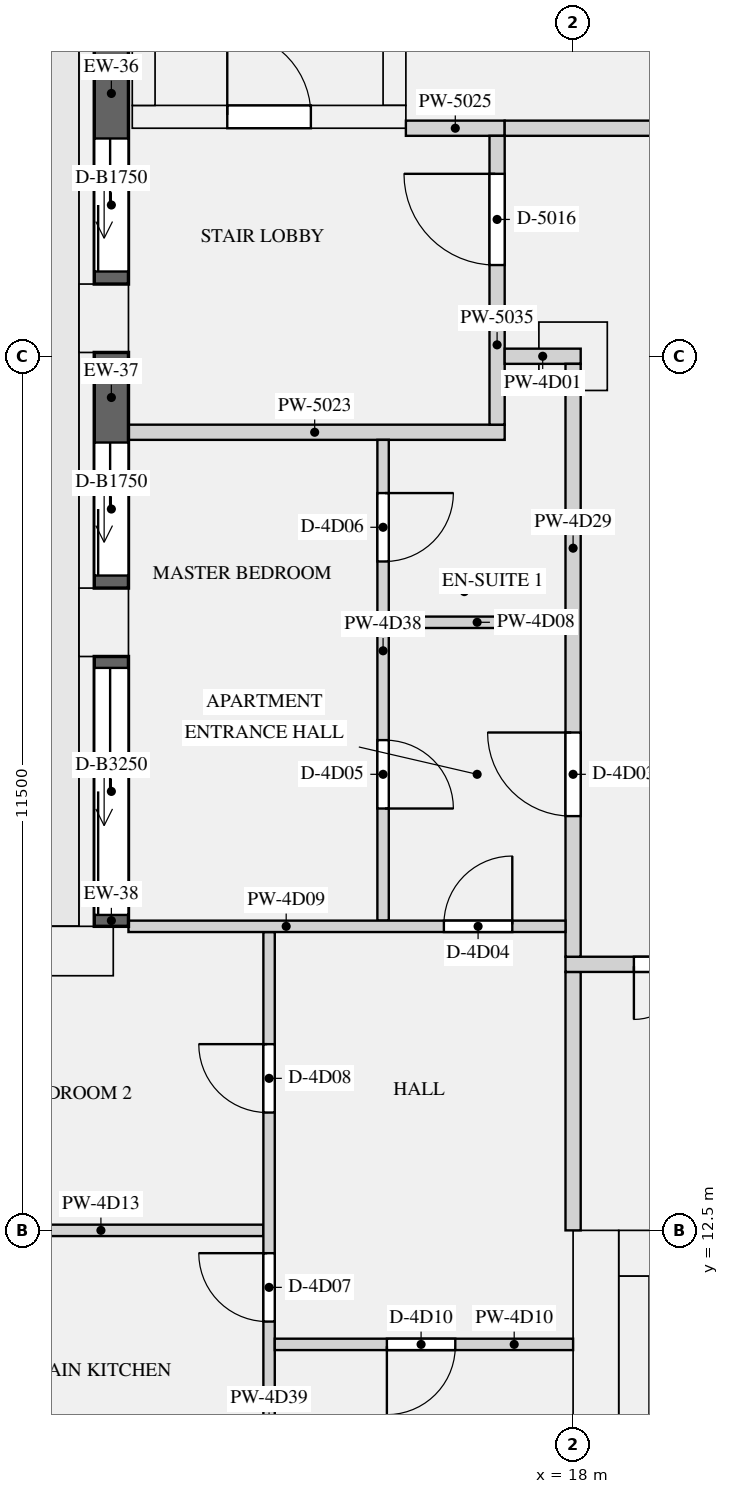
"""IFC4 building model, lengths in metres.
Left out: names, types, materials, properties, quantities, classifications, styles, units other than length and angle.
Written with IfcOpenShell. Run it as: python <this file> out.ifc"""

import sys

from ifc_helpers import new_model, si_unit, direction, frame, frame_2d, origin, origin_2d, place, context, subcontext, project, spatial, rectangle, extrude, element, fill, save


model = new_model("IFC4")
c1 = context("Model", 3, precision=1e-05, world=origin(), true_north=direction((0.0, 1.0)))
c2 = subcontext(c1, "Body", "Model", "MODEL_VIEW")
j1 = project(units=[si_unit("LENGTHUNIT", "METRE"), si_unit("PLANEANGLEUNIT", "RADIAN")], contexts=[c1])
p1 = place(None, origin())
s1 = spatial("IfcSite", under=j1, at=p1, CompositionType="ELEMENT")
p2 = place(p1, origin())
s2 = spatial("IfcBuilding", under=s1, at=p2, CompositionType="ELEMENT")
p3 = place(p2, frame((0.0, 0.0, 223.2)))
s3 = spatial("IfcBuildingStorey", under=s2, at=p3, CompositionType="ELEMENT", Elevation=223.2)
for number, where, z_axis, x_axis in (
    (1, (11.825, 24.5, 0.0), (0.0, 0.0, 1.0), (0.0, -1.0, 0.0)),
    (2, (11.825, 20.5, 0.0), (0.0, 0.0, 1.0), (0.0, -1.0, 0.0)),
    (3, (11.5, 16.175, 0.0), (0.0, 0.0, 1.0), (-1.0, 0.0, 0.0)),
):
    element("IfcColumn", number, at=place(p3, frame(where, z_axis=z_axis, x_axis=x_axis)), inside=s3, PredefinedType="USERDEFINED", context=c2, shape_type="SweptSolid", body=[
        extrude(rectangle(XDim=0.9, YDim=0.65, at=origin_2d()), origin(), (0.0, 0.0, 1.0), 3.15),
    ])
p4 = place(p3, frame((18.0, 24.0, 0.0), z_axis=(0.0, 0.0, 1.0), x_axis=(1.0, 0.0, 0.0)))
e4 = element("IfcColumn", 4, at=p4, inside=s3, PredefinedType="COLUMN", context=c2, shape_type="SweptSolid", body=[
    extrude(rectangle(XDim=0.9, YDim=0.9, at=origin_2d()), origin(), (0.0, 0.0, 1.0), 3.15),
])
p5 = place(p3, frame((18.3, 0.0, 0.0), z_axis=(0.0, 0.0, 1.0), x_axis=(0.0, 1.0, 0.0)))
e5 = element("IfcWall", 5, at=p5, inside=s3, PredefinedType="SHEAR", context=c2, shape_type="SweptSolid", body=[
    extrude(rectangle(XDim=12.5, YDim=0.6, at=frame_2d((6.25, 0.0))), origin(), (0.0, 0.0, 1.0), 3.15),
])
p6 = place(p3, frame((18.6, 12.2, 0.0), z_axis=(0.0, 0.0, 1.0), x_axis=(1.0, 0.0, 0.0)))
e6 = element("IfcWall", 6, at=p6, inside=s3, PredefinedType="SHEAR", context=c2, shape_type="SweptSolid", body=[
    extrude(rectangle(XDim=34.8, YDim=0.6, at=frame_2d((17.4, 0.0))), origin(), (0.0, 0.0, 1.0), 3.15),
])
p7 = place(p6, frame((24.575, 0.0, 0.0)))
e7 = element("IfcOpeningElement", 7, at=p7, cuts=e6, PredefinedType="OPENING", context=c2, shape_type="SweptSolid", body=[
    extrude(rectangle(XDim=1.1, YDim=2.1, at=frame_2d((0.55, 1.05))), frame((0.0, 0.31, 0.0), z_axis=(0.0, -1.0, 0.0), x_axis=(1.0, 0.0, 0.0)), (0.0, 0.0, 1.0), 0.62),
])
p8 = place(p6, frame((26.825, 0.0, 0.0)))
e8 = element("IfcOpeningElement", 8, at=p8, cuts=e6, PredefinedType="OPENING", context=c2, shape_type="SweptSolid", body=[
    extrude(rectangle(XDim=1.1, YDim=2.1, at=frame_2d((0.55, 1.05))), frame((0.0, 0.31, 0.0), z_axis=(0.0, -1.0, 0.0), x_axis=(1.0, 0.0, 0.0)), (0.0, 0.0, 1.0), 0.62),
])
p9 = place(p6, frame((29.075, 0.0, 0.0)))
e9 = element("IfcOpeningElement", 9, at=p9, cuts=e6, PredefinedType="OPENING", context=c2, shape_type="SweptSolid", body=[
    extrude(rectangle(XDim=1.1, YDim=2.1, at=frame_2d((0.55, 1.05))), frame((0.0, 0.31, 0.0), z_axis=(0.0, -1.0, 0.0), x_axis=(1.0, 0.0, 0.0)), (0.0, 0.0, 1.0), 0.62),
])
p10 = place(p6, frame((11.95, 0.0, 0.0)))
e10 = element("IfcOpeningElement", 10, at=p10, cuts=e6, PredefinedType="OPENING", context=c2, shape_type="SweptSolid", body=[
    extrude(rectangle(XDim=0.9, YDim=2.1, at=frame_2d((0.45, 1.05))), frame((0.0, 0.31, 0.0), z_axis=(0.0, -1.0, 0.0), x_axis=(1.0, 0.0, 0.0)), (0.0, 0.0, 1.0), 0.62),
])
p11 = place(p6, frame((18.45, 0.0, 0.0)))
e11 = element("IfcOpeningElement", 11, at=p11, cuts=e6, PredefinedType="OPENING", context=c2, shape_type="SweptSolid", body=[
    extrude(rectangle(XDim=0.9, YDim=2.1, at=frame_2d((0.45, 1.05))), frame((0.0, 0.31, 0.0), z_axis=(0.0, -1.0, 0.0), x_axis=(1.0, 0.0, 0.0)), (0.0, 0.0, 1.0), 0.62),
])
p12 = place(p6, frame((1.55, 0.0, 0.0)))
e12 = element("IfcOpeningElement", 12, at=p12, cuts=e6, PredefinedType="OPENING", context=c2, shape_type="SweptSolid", body=[
    extrude(rectangle(XDim=1.2, YDim=2.1, at=frame_2d((0.6, 1.05))), frame((0.0, 0.31, 0.0), z_axis=(0.0, -1.0, 0.0), x_axis=(1.0, 0.0, 0.0)), (0.0, 0.0, 1.0), 0.62),
])
p13 = place(p6, frame((32.05, 0.0, 0.0)))
e13 = element("IfcOpeningElement", 13, at=p13, cuts=e6, PredefinedType="OPENING", context=c2, shape_type="SweptSolid", body=[
    extrude(rectangle(XDim=1.2, YDim=2.1, at=frame_2d((0.6, 1.05))), frame((0.0, 0.31, 0.0), z_axis=(0.0, -1.0, 0.0), x_axis=(1.0, 0.0, 0.0)), (0.0, 0.0, 1.0), 0.62),
])
p14 = place(p3, frame((18.8, 1.0, 0.0), z_axis=(0.0, 0.0, 1.0), x_axis=(0.0, 1.0, 0.0)))
e14 = element("IfcWall", 14, at=p14, inside=s3, PredefinedType="SHEAR", context=c2, shape_type="SweptSolid", body=[
    extrude(rectangle(XDim=10.9, YDim=0.4, at=frame_2d((5.45, 0.0))), origin(), (0.0, 0.0, 1.0), 3.15),
])
p15 = place(p3, frame((12.2, 27.15, 0.0), z_axis=(0.0, 0.0, 1.0), x_axis=(1.0, 0.0, 0.0)))
e15 = element("IfcWall", 15, at=p15, inside=s3, PredefinedType="SHEAR", context=c2, shape_type="SweptSolid", body=[
    extrude(rectangle(XDim=3.6, YDim=0.3, at=frame_2d((1.8, 0.0))), origin(), (0.0, 0.0, 1.0), 3.15),
])
p16 = place(p15, frame((1.25, 0.0, 0.0)))
e16 = element("IfcOpeningElement", 16, at=p16, cuts=e15, PredefinedType="OPENING", context=c2, shape_type="SweptSolid", body=[
    extrude(rectangle(XDim=1.1, YDim=2.1, at=frame_2d((0.55, 1.05))), frame((0.0, 0.16, 0.0), z_axis=(0.0, -1.0, 0.0), x_axis=(1.0, 0.0, 0.0)), (0.0, 0.0, 1.0), 0.32),
])
for number, where, z_axis, x_axis in (
    (17, (12.35, 27.3, 0.0), (0.0, 0.0, 1.0), (0.0, 1.0, 0.0)),
    (18, (15.65, 27.3, 0.0), (0.0, 0.0, 1.0), (0.0, 1.0, 0.0)),
):
    element("IfcWall", number, at=place(p3, frame(where, z_axis=z_axis, x_axis=x_axis)), inside=s3, PredefinedType="SHEAR", context=c2, shape_type="SweptSolid", body=[
        extrude(rectangle(XDim=7.8, YDim=0.3, at=frame_2d((3.9, 0.0))), origin(), (0.0, 0.0, 1.0), 3.15),
    ])
p17 = place(p3, frame((11.925, 28.05, 0.0), z_axis=(0.0, 0.0, 1.0), x_axis=(0.0, -1.0, 0.0)))
e19 = element("IfcWall", 19, at=p17, inside=s3, PredefinedType="SOLIDWALL", context=c2, shape_type="SweptSolid", body=[
    extrude(rectangle(XDim=3.1, YDim=0.45, at=frame_2d((1.55, 0.0))), origin(), (0.0, 0.0, 1.0), 2.83),
])
p18 = place(p17, frame((1.185, 0.0, 0.0)))
e20 = element("IfcOpeningElement", 20, at=p18, cuts=e19, PredefinedType="OPENING", context=c2, shape_type="SweptSolid", body=[
    extrude(rectangle(XDim=1.75, YDim=2.3, at=frame_2d((0.875, 1.15))), frame((0.0, 0.235, 0.0), z_axis=(0.0, -1.0, 0.0), x_axis=(1.0, 0.0, 0.0)), (0.0, 0.0, 1.0), 0.47),
])
p19 = place(p3, frame((11.925, 24.05, 0.0), z_axis=(0.0, 0.0, 1.0), x_axis=(0.0, -1.0, 0.0)))
e21 = element("IfcWall", 21, at=p19, inside=s3, PredefinedType="SOLIDWALL", context=c2, shape_type="SweptSolid", body=[
    extrude(rectangle(XDim=3.1, YDim=0.45, at=frame_2d((1.55, 0.0))), origin(), (0.0, 0.0, 1.0), 2.83),
])
p20 = place(p19, frame((1.185, 0.0, 0.0)))
e22 = element("IfcOpeningElement", 22, at=p20, cuts=e21, PredefinedType="OPENING", context=c2, shape_type="SweptSolid", body=[
    extrude(rectangle(XDim=1.75, YDim=2.3, at=frame_2d((0.875, 1.15))), frame((0.0, 0.235, 0.0), z_axis=(0.0, -1.0, 0.0), x_axis=(1.0, 0.0, 0.0)), (0.0, 0.0, 1.0), 0.47),
])
p21 = place(p3, frame((11.925, 20.05, 0.0), z_axis=(0.0, 0.0, 1.0), x_axis=(0.0, -1.0, 0.0)))
e23 = element("IfcWall", 23, at=p21, inside=s3, PredefinedType="SOLIDWALL", context=c2, shape_type="SweptSolid", body=[
    extrude(rectangle(XDim=3.55, YDim=0.45, at=frame_2d((1.775, 0.0))), origin(), (0.0, 0.0, 1.0), 2.83),
])
p22 = place(p21, frame((0.15, 0.0, 0.0)))
e24 = element("IfcOpeningElement", 24, at=p22, cuts=e23, PredefinedType="OPENING", context=c2, shape_type="SweptSolid", body=[
    extrude(rectangle(XDim=3.25, YDim=2.3, at=frame_2d((1.625, 1.15))), frame((0.0, 0.235, 0.0), z_axis=(0.0, -1.0, 0.0), x_axis=(1.0, 0.0, 0.0)), (0.0, 0.0, 1.0), 0.47),
])
p23 = place(p3, frame((12.1, 23.0, 0.0), z_axis=(0.0, 0.0, 1.0), x_axis=(1.0, 0.0, 0.0)))
e25 = element("IfcWall", 25, at=p23, inside=s3, PredefinedType="PARTITIONING", context=c2, shape_type="SweptSolid", body=[
    extrude(rectangle(XDim=5.0, YDim=0.2, at=frame_2d((2.5, 0.0))), origin(), (0.0, 0.0, 1.0), 2.83),
])
p24 = place(p3, frame((15.8, 27.0, 0.0), z_axis=(0.0, 0.0, 1.0), x_axis=(1.0, 0.0, 0.0)))
e26 = element("IfcWall", 26, at=p24, inside=s3, PredefinedType="PARTITIONING", context=c2, shape_type="SweptSolid", body=[
    extrude(rectangle(XDim=1.3, YDim=0.2, at=frame_2d((0.65, 0.0))), origin(), (0.0, 0.0, 1.0), 2.83),
])
p25 = place(p3, frame((18.0, 12.5, 0.0), z_axis=(0.0, 0.0, 1.0), x_axis=(0.0, 1.0, 0.0)))
e27 = element("IfcWall", 27, at=p25, inside=s3, PredefinedType="PARTITIONING", context=c2, shape_type="SweptSolid", body=[
    extrude(rectangle(XDim=3.4, YDim=0.2, at=frame_2d((1.7, 0.0))), origin(), (0.0, 0.0, 1.0), 2.83),
])
p26 = place(p3, frame((17.0, 23.1, 0.0), z_axis=(0.0, 0.0, 1.0), x_axis=(0.0, 1.0, 0.0)))
e28 = element("IfcWall", 28, at=p26, inside=s3, PredefinedType="PARTITIONING", context=c2, shape_type="SweptSolid", body=[
    extrude(rectangle(XDim=3.8, YDim=0.2, at=frame_2d((1.9, 0.0))), origin(), (0.0, 0.0, 1.0), 2.83),
])
p27 = place(p26, frame((2.1, 0.0, 0.0)))
e29 = element("IfcOpeningElement", 29, at=p27, cuts=e28, PredefinedType="OPENING", context=c2, shape_type="SweptSolid", body=[
    extrude(rectangle(XDim=1.2, YDim=2.1, at=frame_2d((0.6, 1.05))), frame((0.0, 0.11, 0.0), z_axis=(0.0, -1.0, 0.0), x_axis=(1.0, 0.0, 0.0)), (0.0, 0.0, 1.0), 0.22),
])
p28 = place(p3, frame((17.1, 24.0, 0.0), z_axis=(0.0, 0.0, 1.0), x_axis=(1.0, 0.0, 0.0)))
e30 = element("IfcWall", 30, at=p28, inside=s3, PredefinedType="PARTITIONING", context=c2, shape_type="SweptSolid", body=[
    extrude(rectangle(XDim=1.0, YDim=0.2, at=frame_2d((0.5, 0.0))), origin(), (0.0, 0.0, 1.0), 2.83),
])
p29 = place(p3, frame((17.1, 27.0, 0.0), z_axis=(0.0, 0.0, 1.0), x_axis=(1.0, 0.0, 0.0)))
e31 = element("IfcWall", 31, at=p29, inside=s3, PredefinedType="PARTITIONING", context=c2, shape_type="SweptSolid", body=[
    extrude(rectangle(XDim=6.975, YDim=0.2, at=frame_2d((3.487, 0.0))), origin(), (0.0, 0.0, 1.0), 2.83),
])
p30 = place(p3, frame((15.575, 20.5, 0.0), z_axis=(0.0, 0.0, 1.0), x_axis=(1.0, 0.0, 0.0)))
e32 = element("IfcWall", 32, at=p30, inside=s3, PredefinedType="PARTITIONING", context=c2, shape_type="SweptSolid", body=[
    extrude(rectangle(XDim=2.325, YDim=0.15, at=frame_2d((1.163, 0.0))), origin(), (0.0, 0.0, 1.0), 2.83),
])
p31 = place(p3, frame((12.15, 16.5, 0.0), z_axis=(0.0, 0.0, 1.0), x_axis=(1.0, 0.0, 0.0)))
e33 = element("IfcWall", 33, at=p31, inside=s3, PredefinedType="PARTITIONING", context=c2, shape_type="SweptSolid", body=[
    extrude(rectangle(XDim=5.75, YDim=0.15, at=frame_2d((2.875, 0.0))), origin(), (0.0, 0.0, 1.0), 2.83),
])
p32 = place(p31, frame((4.15, 0.0, 0.0)))
e34 = element("IfcOpeningElement", 34, at=p32, cuts=e33, PredefinedType="OPENING", context=c2, shape_type="SweptSolid", body=[
    extrude(rectangle(XDim=0.9, YDim=2.1, at=frame_2d((0.45, 1.05))), frame((0.0, 0.085, 0.0), z_axis=(0.0, -1.0, 0.0), x_axis=(1.0, 0.0, 0.0)), (0.0, 0.0, 1.0), 0.17),
])
p33 = place(p3, frame((14.075, 11.0, 0.0), z_axis=(0.0, 0.0, 1.0), x_axis=(1.0, 0.0, 0.0)))
e35 = element("IfcWall", 35, at=p33, inside=s3, PredefinedType="PARTITIONING", context=c2, shape_type="SweptSolid", body=[
    extrude(rectangle(XDim=3.925, YDim=0.15, at=frame_2d((1.962, 0.0))), origin(), (0.0, 0.0, 1.0), 2.83),
])
p34 = place(p33, frame((1.475, 0.0, 0.0)))
e36 = element("IfcOpeningElement", 36, at=p34, cuts=e35, PredefinedType="OPENING", context=c2, shape_type="SweptSolid", body=[
    extrude(rectangle(XDim=0.9, YDim=2.1, at=frame_2d((0.45, 1.05))), frame((0.0, 0.085, 0.0), z_axis=(0.0, -1.0, 0.0), x_axis=(1.0, 0.0, 0.0)), (0.0, 0.0, 1.0), 0.17),
])
p35 = place(p3, frame((9.65, 12.5, 0.0), z_axis=(0.0, 0.0, 1.0), x_axis=(1.0, 0.0, 0.0)))
e37 = element("IfcWall", 37, at=p35, inside=s3, PredefinedType="PARTITIONING", context=c2, shape_type="SweptSolid", body=[
    extrude(rectangle(XDim=4.275, YDim=0.15, at=frame_2d((2.138, 0.0))), origin(), (0.0, 0.0, 1.0), 2.83),
])
p36 = place(p3, frame((17.9, 16.0, 0.0), z_axis=(0.0, 0.0, 1.0), x_axis=(1.0, 0.0, 0.0)))
e38 = element("IfcWall", 38, at=p36, inside=s3, PredefinedType="PARTITIONING", context=c2, shape_type="SweptSolid", body=[
    extrude(rectangle(XDim=36.2, YDim=0.2, at=frame_2d((18.1, 0.0))), origin(), (0.0, 0.0, 1.0), 2.83),
])
p37 = place(p36, frame((0.9, 0.0, 0.0)))
e39 = element("IfcOpeningElement", 39, at=p37, cuts=e38, PredefinedType="OPENING", context=c2, shape_type="SweptSolid", body=[
    extrude(rectangle(XDim=1.4, YDim=2.1, at=frame_2d((0.7, 1.05))), frame((0.0, 0.11, 0.0), z_axis=(0.0, -1.0, 0.0), x_axis=(1.0, 0.0, 0.0)), (0.0, 0.0, 1.0), 0.22),
])
p38 = place(p36, frame((33.9, 0.0, 0.0)))
e40 = element("IfcOpeningElement", 40, at=p38, cuts=e38, PredefinedType="OPENING", context=c2, shape_type="SweptSolid", body=[
    extrude(rectangle(XDim=1.4, YDim=2.1, at=frame_2d((0.7, 1.05))), frame((0.0, 0.11, 0.0), z_axis=(0.0, -1.0, 0.0), x_axis=(1.0, 0.0, 0.0)), (0.0, 0.0, 1.0), 0.22),
])
p39 = place(p3, frame((18.0, 16.1, 0.0), z_axis=(0.0, 0.0, 1.0), x_axis=(0.0, 1.0, 0.0)))
e41 = element("IfcWall", 41, at=p39, inside=s3, PredefinedType="PARTITIONING", context=c2, shape_type="SweptSolid", body=[
    extrude(rectangle(XDim=7.8, YDim=0.2, at=frame_2d((3.9, 0.0))), origin(), (0.0, 0.0, 1.0), 2.83),
])
p40 = place(p39, frame((1.85, 0.0, 0.0)))
e42 = element("IfcOpeningElement", 42, at=p40, cuts=e41, PredefinedType="OPENING", context=c2, shape_type="SweptSolid", body=[
    extrude(rectangle(XDim=1.1, YDim=2.1, at=frame_2d((0.55, 1.05))), frame((0.0, 0.11, 0.0), z_axis=(0.0, -1.0, 0.0), x_axis=(1.0, 0.0, 0.0)), (0.0, 0.0, 1.0), 0.22),
])
p41 = place(p3, frame((15.5, 16.575, 0.0), z_axis=(0.0, 0.0, 1.0), x_axis=(0.0, 1.0, 0.0)))
e43 = element("IfcWall", 43, at=p41, inside=s3, PredefinedType="PARTITIONING", context=c2, shape_type="SweptSolid", body=[
    extrude(rectangle(XDim=6.325, YDim=0.15, at=frame_2d((3.163, 0.0))), origin(), (0.0, 0.0, 1.0), 2.83),
])
p42 = place(p41, frame((1.475, 0.0, 0.0)))
e44 = element("IfcOpeningElement", 44, at=p42, cuts=e43, PredefinedType="OPENING", context=c2, shape_type="SweptSolid", body=[
    extrude(rectangle(XDim=0.9, YDim=2.1, at=frame_2d((0.45, 1.05))), frame((0.0, 0.085, 0.0), z_axis=(0.0, -1.0, 0.0), x_axis=(1.0, 0.0, 0.0)), (0.0, 0.0, 1.0), 0.17),
])
p43 = place(p41, frame((4.725, 0.0, 0.0)))
e45 = element("IfcOpeningElement", 45, at=p43, cuts=e43, PredefinedType="OPENING", context=c2, shape_type="SweptSolid", body=[
    extrude(rectangle(XDim=0.9, YDim=2.1, at=frame_2d((0.45, 1.05))), frame((0.0, 0.085, 0.0), z_axis=(0.0, -1.0, 0.0), x_axis=(1.0, 0.0, 0.0)), (0.0, 0.0, 1.0), 0.17),
])
p44 = place(p3, frame((14.0, 8.575, 0.0), z_axis=(0.0, 0.0, 1.0), x_axis=(0.0, 1.0, 0.0)))
e46 = element("IfcWall", 46, at=p44, inside=s3, PredefinedType="PARTITIONING", context=c2, shape_type="SweptSolid", body=[
    extrude(rectangle(XDim=7.85, YDim=0.15, at=frame_2d((3.925, 0.0))), origin(), (0.0, 0.0, 1.0), 2.83),
])
p45 = place(p44, frame((2.725, 0.0, 0.0)))
e47 = element("IfcOpeningElement", 47, at=p45, cuts=e46, PredefinedType="OPENING", context=c2, shape_type="SweptSolid", body=[
    extrude(rectangle(XDim=0.9, YDim=2.1, at=frame_2d((0.45, 1.05))), frame((0.0, 0.085, 0.0), z_axis=(0.0, -1.0, 0.0), x_axis=(1.0, 0.0, 0.0)), (0.0, 0.0, 1.0), 0.17),
])
p46 = place(p44, frame((5.475, 0.0, 0.0)))
e48 = element("IfcOpeningElement", 48, at=p46, cuts=e46, PredefinedType="OPENING", context=c2, shape_type="SweptSolid", body=[
    extrude(rectangle(XDim=0.9, YDim=2.1, at=frame_2d((0.45, 1.05))), frame((0.0, 0.085, 0.0), z_axis=(0.0, -1.0, 0.0), x_axis=(1.0, 0.0, 0.0)), (0.0, 0.0, 1.0), 0.17),
])
p47 = place(p18, frame((1.75, -0.19, 0.0), z_axis=(0.0, 0.0, 1.0), x_axis=(-1.0, 0.0, 0.0)))
e49 = element("IfcDoor", 49, at=p47, inside=s3, OperationType="SLIDING_TO_LEFT", PredefinedType="DOOR", context=c2, shape_type="SweptSolid", body=[
    extrude(rectangle(XDim=1.75, YDim=2.3, at=frame_2d((0.875, 1.15))), frame((0.0, -0.07, 0.0), z_axis=(0.0, -1.0, 0.0), x_axis=(1.0, 0.0, 0.0)), (0.0, 0.0, 1.0), 0.05),
])
fill(e20, e49)
p48 = place(p20, origin())
e50 = element("IfcDoor", 50, at=p48, inside=s3, OperationType="SLIDING_TO_LEFT", PredefinedType="DOOR", context=c2, shape_type="SweptSolid", body=[
    extrude(rectangle(XDim=1.75, YDim=2.3, at=frame_2d((0.875, 1.15))), frame((0.0, -0.07, 0.0), z_axis=(0.0, -1.0, 0.0), x_axis=(1.0, 0.0, 0.0)), (0.0, 0.0, 1.0), 0.05),
])
fill(e22, e50)
p49 = place(p22, origin())
e51 = element("IfcDoor", 51, at=p49, inside=s3, OperationType="SLIDING_TO_LEFT", PredefinedType="DOOR", context=c2, shape_type="SweptSolid", body=[
    extrude(rectangle(XDim=3.25, YDim=2.3, at=frame_2d((1.625, 1.15))), frame((0.0, -0.07, 0.0), z_axis=(0.0, -1.0, 0.0), x_axis=(1.0, 0.0, 0.0)), (0.0, 0.0, 1.0), 0.05),
])
fill(e24, e51)
p50 = place(p16, origin())
e52 = element("IfcDoor", 52, at=p50, inside=s3, OperationType="SINGLE_SWING_LEFT", PredefinedType="DOOR", context=c2, shape_type="SweptSolid", body=[
    extrude(rectangle(XDim=1.1, YDim=2.1, at=frame_2d((0.55, 1.05))), frame((0.0, 0.025, 0.0), z_axis=(0.0, -1.0, 0.0), x_axis=(1.0, 0.0, 0.0)), (0.0, 0.0, 1.0), 0.05),
])
fill(e16, e52)
p51 = place(p27, origin())
e53 = element("IfcDoor", 53, at=p51, inside=s3, OperationType="SINGLE_SWING_RIGHT", PredefinedType="DOOR", context=c2, shape_type="SweptSolid", body=[
    extrude(rectangle(XDim=1.2, YDim=2.1, at=frame_2d((0.6, 1.05))), frame((0.0, 0.025, 0.0), z_axis=(0.0, -1.0, 0.0), x_axis=(1.0, 0.0, 0.0)), (0.0, 0.0, 1.0), 0.05),
])
fill(e29, e53)
p52 = place(p37, frame((1.4, 0.0, 0.0), z_axis=(0.0, 0.0, 1.0), x_axis=(-1.0, 0.0, 0.0)))
e54 = element("IfcDoor", 54, at=p52, inside=s3, OperationType="DOUBLE_DOOR_SINGLE_SWING", PredefinedType="DOOR", context=c2, shape_type="SweptSolid", body=[
    extrude(rectangle(XDim=1.4, YDim=2.1, at=frame_2d((0.7, 1.05))), frame((0.0, 0.025, 0.0), z_axis=(0.0, -1.0, 0.0), x_axis=(1.0, 0.0, 0.0)), (0.0, 0.0, 1.0), 0.05),
])
fill(e39, e54)
p53 = place(p40, origin())
e55 = element("IfcDoor", 55, at=p53, inside=s3, OperationType="SINGLE_SWING_RIGHT", PredefinedType="DOOR", context=c2, shape_type="SweptSolid", body=[
    extrude(rectangle(XDim=1.1, YDim=2.1, at=frame_2d((0.55, 1.05))), frame((0.0, 0.025, 0.0), z_axis=(0.0, -1.0, 0.0), x_axis=(1.0, 0.0, 0.0)), (0.0, 0.0, 1.0), 0.05),
])
fill(e42, e55)
p54 = place(p32, origin())
e56 = element("IfcDoor", 56, at=p54, inside=s3, OperationType="SINGLE_SWING_RIGHT", PredefinedType="DOOR", context=c2, shape_type="SweptSolid", body=[
    extrude(rectangle(XDim=0.9, YDim=2.1, at=frame_2d((0.45, 1.05))), frame((0.0, 0.025, 0.0), z_axis=(0.0, -1.0, 0.0), x_axis=(1.0, 0.0, 0.0)), (0.0, 0.0, 1.0), 0.05),
])
fill(e34, e56)
p55 = place(p42, frame((0.9, 0.0, 0.0), z_axis=(0.0, 0.0, 1.0), x_axis=(-1.0, 0.0, 0.0)))
e57 = element("IfcDoor", 57, at=p55, inside=s3, OperationType="SINGLE_SWING_RIGHT", PredefinedType="DOOR", context=c2, shape_type="SweptSolid", body=[
    extrude(rectangle(XDim=0.9, YDim=2.1, at=frame_2d((0.45, 1.05))), frame((0.0, 0.025, 0.0), z_axis=(0.0, -1.0, 0.0), x_axis=(1.0, 0.0, 0.0)), (0.0, 0.0, 1.0), 0.05),
])
fill(e44, e57)
p56 = place(p43, frame((0.9, 0.0, 0.0), z_axis=(0.0, 0.0, 1.0), x_axis=(-1.0, 0.0, 0.0)))
e58 = element("IfcDoor", 58, at=p56, inside=s3, OperationType="SINGLE_SWING_LEFT", PredefinedType="DOOR", context=c2, shape_type="SweptSolid", body=[
    extrude(rectangle(XDim=0.9, YDim=2.1, at=frame_2d((0.45, 1.05))), frame((0.0, 0.025, 0.0), z_axis=(0.0, -1.0, 0.0), x_axis=(1.0, 0.0, 0.0)), (0.0, 0.0, 1.0), 0.05),
])
fill(e45, e58)
p57 = place(p45, origin())
e59 = element("IfcDoor", 59, at=p57, inside=s3, OperationType="SINGLE_SWING_RIGHT", PredefinedType="DOOR", context=c2, shape_type="SweptSolid", body=[
    extrude(rectangle(XDim=0.9, YDim=2.1, at=frame_2d((0.45, 1.05))), frame((0.0, 0.025, 0.0), z_axis=(0.0, -1.0, 0.0), x_axis=(1.0, 0.0, 0.0)), (0.0, 0.0, 1.0), 0.05),
])
fill(e47, e59)
p58 = place(p46, origin())
e60 = element("IfcDoor", 60, at=p58, inside=s3, OperationType="SINGLE_SWING_RIGHT", PredefinedType="DOOR", context=c2, shape_type="SweptSolid", body=[
    extrude(rectangle(XDim=0.9, YDim=2.1, at=frame_2d((0.45, 1.05))), frame((0.0, 0.025, 0.0), z_axis=(0.0, -1.0, 0.0), x_axis=(1.0, 0.0, 0.0)), (0.0, 0.0, 1.0), 0.05),
])
fill(e48, e60)
p59 = place(p34, frame((0.9, 0.0, 0.0), z_axis=(0.0, 0.0, 1.0), x_axis=(-1.0, 0.0, 0.0)))
e61 = element("IfcDoor", 61, at=p59, inside=s3, OperationType="SINGLE_SWING_RIGHT", PredefinedType="DOOR", context=c2, shape_type="SweptSolid", body=[
    extrude(rectangle(XDim=0.9, YDim=2.1, at=frame_2d((0.45, 1.05))), frame((0.0, 0.025, 0.0), z_axis=(0.0, -1.0, 0.0), x_axis=(1.0, 0.0, 0.0)), (0.0, 0.0, 1.0), 0.05),
])
fill(e36, e61)
save(model, sys.argv[1])
